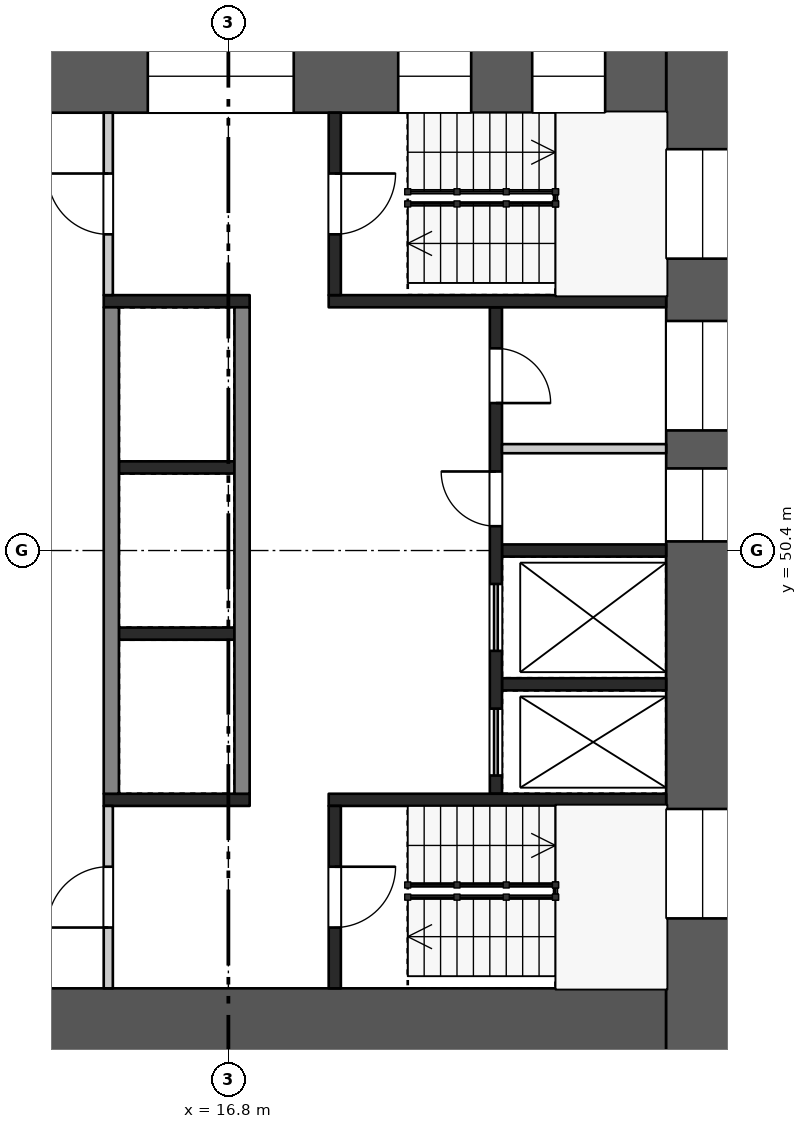
"""IFC4 building model, lengths in metres.
Left out: names, types, materials, properties, quantities, classifications, styles, units other than length and angle.
Written with IfcOpenShell. Run it as: python <this file> out.ifc"""

import sys

from ifc_helpers import new_model, si_unit, direction, frame, frame_2d, origin, place, context, subcontext, project, spatial, rectangle, extrude, element, fill, save


model = new_model("IFC4")
c1 = context("Model", 3, precision=1e-05, world=origin(), true_north=direction((0.0, 1.0)))
c2 = subcontext(c1, "Body", "Model", "MODEL_VIEW")
j1 = project(units=[si_unit("LENGTHUNIT", "METRE"), si_unit("PLANEANGLEUNIT", "RADIAN")], contexts=[c1])
p1 = place(None, origin())
s1 = spatial("IfcSite", under=j1, at=p1, CompositionType="ELEMENT")
p2 = place(p1, origin())
s2 = spatial("IfcBuilding", under=s1, at=p2, CompositionType="ELEMENT")
p3 = place(p2, frame((0.0, 0.0, 46.2)))
s3 = spatial("IfcBuildingStorey", under=s2, at=p3, CompositionType="ELEMENT", Elevation=46.2)
p4 = place(p3, frame((24.6, 58.8, 0.0), z_axis=(0.0, 0.0, 1.0), x_axis=(0.0, -1.0, 0.0)))
e1 = element("IfcWall", 1, at=p4, inside=s3, PredefinedType="SHEAR", context=c2, shape_type="SweptSolid", body=[
    extrude(rectangle(XDim=16.8, YDim=1.2, at=frame_2d((8.4, 0.0))), origin(), (0.0, 0.0, 1.0), 3.22),
])
p5 = place(p4, frame((1.8, 0.0, 0.5)))
e2 = element("IfcOpeningElement", 2, at=p5, cuts=e1, PredefinedType="OPENING", context=c2, shape_type="SweptSolid", body=[
    extrude(rectangle(XDim=1.8, YDim=2.4, at=frame_2d((0.9, 1.2))), frame((0.0, 0.61, 0.0), z_axis=(0.0, -1.0, 0.0), x_axis=(1.0, 0.0, 0.0)), (0.0, 0.0, 1.0), 1.22),
])
p6 = place(p4, frame((4.625, 0.0, 1.6)))
e3 = element("IfcOpeningElement", 3, at=p6, cuts=e1, PredefinedType="OPENING", context=c2, shape_type="SweptSolid", body=[
    extrude(rectangle(XDim=1.8, YDim=1.2, at=frame_2d((0.9, 0.6))), frame((0.0, 0.61, 0.0), z_axis=(0.0, -1.0, 0.0), x_axis=(1.0, 0.0, 0.0)), (0.0, 0.0, 1.0), 1.22),
])
p7 = place(p4, frame((7.05, 0.0, 1.6)))
e4 = element("IfcOpeningElement", 4, at=p7, cuts=e1, PredefinedType="OPENING", context=c2, shape_type="SweptSolid", body=[
    extrude(rectangle(XDim=1.2, YDim=1.2, at=frame_2d((0.6, 0.6))), frame((0.0, 0.61, 0.0), z_axis=(0.0, -1.0, 0.0), x_axis=(1.0, 0.0, 0.0)), (0.0, 0.0, 1.0), 1.22),
])
p8 = place(p4, frame((12.65, 0.0, 0.5)))
e5 = element("IfcOpeningElement", 5, at=p8, cuts=e1, PredefinedType="OPENING", context=c2, shape_type="SweptSolid", body=[
    extrude(rectangle(XDim=1.8, YDim=2.4, at=frame_2d((0.9, 1.2))), frame((0.0, 0.61, 0.0), z_axis=(0.0, -1.0, 0.0), x_axis=(1.0, 0.0, 0.0)), (0.0, 0.0, 1.0), 1.22),
])
p9 = place(p3, frame((9.6, 58.2, 0.0), z_axis=(0.0, 0.0, 1.0), x_axis=(1.0, 0.0, 0.0)))
e6 = element("IfcWall", 6, at=p9, inside=s3, PredefinedType="SHEAR", context=c2, shape_type="SweptSolid", body=[
    extrude(rectangle(XDim=14.4, YDim=1.2, at=frame_2d((7.2, 0.0))), origin(), (0.0, 0.0, 1.0), 3.22),
])
p10 = place(p9, frame((1.105, 0.0, 0.6)))
e7 = element("IfcOpeningElement", 7, at=p10, cuts=e6, PredefinedType="OPENING", context=c2, shape_type="SweptSolid", body=[
    extrude(rectangle(XDim=3.0, YDim=2.1, at=frame_2d((1.5, 1.05))), frame((0.0, 0.61, 0.0), z_axis=(0.0, -1.0, 0.0), x_axis=(1.0, 0.0, 0.0)), (0.0, 0.0, 1.0), 1.22),
])
p11 = place(p9, frame((5.875, 0.0, 0.6)))
e8 = element("IfcOpeningElement", 8, at=p11, cuts=e6, PredefinedType="OPENING", context=c2, shape_type="SweptSolid", body=[
    extrude(rectangle(XDim=2.4, YDim=2.1, at=frame_2d((1.2, 1.05))), frame((0.0, 0.61, 0.0), z_axis=(0.0, -1.0, 0.0), x_axis=(1.0, 0.0, 0.0)), (0.0, 0.0, 1.0), 1.22),
])
p12 = place(p9, frame((9.993, 0.0, 0.5)))
e9 = element("IfcOpeningElement", 9, at=p12, cuts=e6, PredefinedType="OPENING", context=c2, shape_type="SweptSolid", body=[
    extrude(rectangle(XDim=1.2, YDim=2.4, at=frame_2d((0.6, 1.2))), frame((0.0, 0.61, 0.0), z_axis=(0.0, -1.0, 0.0), x_axis=(1.0, 0.0, 0.0)), (0.0, 0.0, 1.0), 1.22),
])
p13 = place(p9, frame((12.197, 0.0, 0.5)))
e10 = element("IfcOpeningElement", 10, at=p13, cuts=e6, PredefinedType="OPENING", context=c2, shape_type="SweptSolid", body=[
    extrude(rectangle(XDim=1.2, YDim=2.4, at=frame_2d((0.6, 1.2))), frame((0.0, 0.61, 0.0), z_axis=(0.0, -1.0, 0.0), x_axis=(1.0, 0.0, 0.0)), (0.0, 0.0, 1.0), 1.22),
])
p14 = place(p3, frame((9.6, 42.6, 0.0), z_axis=(0.0, 0.0, 1.0), x_axis=(1.0, 0.0, 0.0)))
e11 = element("IfcWall", 11, at=p14, inside=s3, PredefinedType="SHEAR", context=c2, shape_type="SweptSolid", body=[
    extrude(rectangle(XDim=14.4, YDim=1.2, at=frame_2d((7.2, 0.0))), origin(), (0.0, 0.0, 1.0), 3.22),
])
p15 = place(p14, frame((2.1, 0.0, 0.0)))
e12 = element("IfcOpeningElement", 12, at=p15, cuts=e11, PredefinedType="OPENING", context=c2, shape_type="SweptSolid", body=[
    extrude(rectangle(XDim=1.8, YDim=2.1, at=frame_2d((0.9, 1.05))), frame((0.0, 0.61, 0.0), z_axis=(0.0, -1.0, 0.0), x_axis=(1.0, 0.0, 0.0)), (0.0, 0.0, 1.0), 1.22),
])
for number, where, z_axis, x_axis in (
    (13, (15.0, 51.767, 0.0), (0.0, 0.0, 1.0), (1.0, 0.0, 0.0)),
    (14, (15.0, 49.033, 0.0), (0.0, 0.0, 1.0), (1.0, 0.0, 0.0)),
):
    element("IfcWall", number, at=place(p3, frame(where, z_axis=z_axis, x_axis=x_axis)), inside=s3, PredefinedType="SHEAR", context=c2, shape_type="SweptSolid", body=[
        extrude(rectangle(XDim=1.9, YDim=0.2, at=frame_2d((0.95, 0.0))), origin(), (0.0, 0.0, 1.0), 3.22),
    ])
for number, where, z_axis, x_axis in (
    (15, (14.875, 54.4, 0.0), (0.0, 0.0, 1.0), (0.0, -1.0, 0.0)),
    (16, (17.025, 54.4, 0.0), (0.0, 0.0, 1.0), (0.0, -1.0, 0.0)),
):
    element("IfcWall", number, at=place(p3, frame(where, z_axis=z_axis, x_axis=x_axis)), inside=s3, PredefinedType="SHEAR", context=c2, shape_type="SweptSolid", body=[
        extrude(rectangle(XDim=8.0, YDim=0.25, at=frame_2d((4.0, 0.0))), origin(), (0.0, 0.0, 1.0), 3.22),
    ])
for number, where, z_axis, x_axis in (
    (17, (21.3, 50.4, 0.0), (0.0, 0.0, 1.0), (1.0, 0.0, 0.0)),
    (18, (21.3, 48.2, 0.0), (0.0, 0.0, 1.0), (1.0, 0.0, 0.0)),
):
    element("IfcWall", number, at=place(p3, frame(where, z_axis=z_axis, x_axis=x_axis)), inside=s3, PredefinedType="SHEAR", context=c2, shape_type="SweptSolid", body=[
        extrude(rectangle(XDim=2.7, YDim=0.2, at=frame_2d((1.35, 0.0))), origin(), (0.0, 0.0, 1.0), 3.22),
    ])
p16 = place(p3, frame((21.3, 52.075, 0.0), z_axis=(0.0, 0.0, 1.0), x_axis=(1.0, 0.0, 0.0)))
e19 = element("IfcWall", 19, at=p16, inside=s3, PredefinedType="PARTITIONING", context=c2, shape_type="SweptSolid", body=[
    extrude(rectangle(XDim=2.7, YDim=0.15, at=frame_2d((1.35, 0.0))), origin(), (0.0, 0.0, 1.0), 3.22),
])
p17 = place(p3, frame((21.2, 54.4, 0.0), z_axis=(0.0, 0.0, 1.0), x_axis=(0.0, -1.0, 0.0)))
e20 = element("IfcWall", 20, at=p17, inside=s3, PredefinedType="SHEAR", context=c2, shape_type="SweptSolid", body=[
    extrude(rectangle(XDim=8.0, YDim=0.2, at=frame_2d((4.0, 0.0))), origin(), (0.0, 0.0, 1.0), 3.22),
])
p18 = place(p17, frame((0.675, 0.0, 0.0)))
e21 = element("IfcOpeningElement", 21, at=p18, cuts=e20, PredefinedType="OPENING", context=c2, shape_type="SweptSolid", body=[
    extrude(rectangle(XDim=0.9, YDim=2.1, at=frame_2d((0.45, 1.05))), frame((0.0, 0.11, 0.0), z_axis=(0.0, -1.0, 0.0), x_axis=(1.0, 0.0, 0.0)), (0.0, 0.0, 1.0), 0.22),
])
p19 = place(p17, frame((2.7, 0.0, 0.0)))
e22 = element("IfcOpeningElement", 22, at=p19, cuts=e20, PredefinedType="OPENING", context=c2, shape_type="SweptSolid", body=[
    extrude(rectangle(XDim=0.9, YDim=2.1, at=frame_2d((0.45, 1.05))), frame((0.0, 0.11, 0.0), z_axis=(0.0, -1.0, 0.0), x_axis=(1.0, 0.0, 0.0)), (0.0, 0.0, 1.0), 0.22),
])
p20 = place(p17, frame((4.55, 0.0, 0.0)))
e23 = element("IfcOpeningElement", 23, at=p20, cuts=e20, PredefinedType="OPENING", context=c2, shape_type="SweptSolid", body=[
    extrude(rectangle(XDim=1.1, YDim=2.1, at=frame_2d((0.55, 1.05))), frame((0.0, 0.11, 0.0), z_axis=(0.0, -1.0, 0.0), x_axis=(1.0, 0.0, 0.0)), (0.0, 0.0, 1.0), 0.22),
])
p21 = place(p17, frame((6.6, 0.0, 0.0)))
e24 = element("IfcOpeningElement", 24, at=p21, cuts=e20, PredefinedType="OPENING", context=c2, shape_type="SweptSolid", body=[
    extrude(rectangle(XDim=1.1, YDim=2.1, at=frame_2d((0.55, 1.05))), frame((0.0, 0.11, 0.0), z_axis=(0.0, -1.0, 0.0), x_axis=(1.0, 0.0, 0.0)), (0.0, 0.0, 1.0), 0.22),
])
p22 = place(p3, frame((14.75, 54.5, 0.0), z_axis=(0.0, 0.0, 1.0), x_axis=(1.0, 0.0, 0.0)))
e25 = element("IfcWall", 25, at=p22, inside=s3, PredefinedType="SHEAR", context=c2, shape_type="SweptSolid", body=[
    extrude(rectangle(XDim=2.4, YDim=0.2, at=frame_2d((1.2, 0.0))), origin(), (0.0, 0.0, 1.0), 3.22),
])
p23 = place(p3, frame((18.45, 54.5, 0.0), z_axis=(0.0, 0.0, 1.0), x_axis=(1.0, 0.0, 0.0)))
e26 = element("IfcWall", 26, at=p23, inside=s3, PredefinedType="SHEAR", context=c2, shape_type="SweptSolid", body=[
    extrude(rectangle(XDim=5.55, YDim=0.2, at=frame_2d((2.775, 0.0))), origin(), (0.0, 0.0, 1.0), 3.22),
])
p24 = place(p3, frame((14.825, 57.6, 0.0), z_axis=(0.0, 0.0, 1.0), x_axis=(0.0, -1.0, 0.0)))
e27 = element("IfcWall", 27, at=p24, inside=s3, PredefinedType="PARTITIONING", context=c2, shape_type="SweptSolid", body=[
    extrude(rectangle(XDim=3.0, YDim=0.15, at=frame_2d((1.5, 0.0))), origin(), (0.0, 0.0, 1.0), 3.22),
])
p25 = place(p24, frame((1.0, 0.0, 0.0)))
e28 = element("IfcOpeningElement", 28, at=p25, cuts=e27, PredefinedType="OPENING", context=c2, shape_type="SweptSolid", body=[
    extrude(rectangle(XDim=1.0, YDim=2.1, at=frame_2d((0.5, 1.05))), frame((0.0, 0.085, 0.0), z_axis=(0.0, -1.0, 0.0), x_axis=(1.0, 0.0, 0.0)), (0.0, 0.0, 1.0), 0.17),
])
p26 = place(p3, frame((18.55, 57.6, 0.0), z_axis=(0.0, 0.0, 1.0), x_axis=(0.0, -1.0, 0.0)))
e29 = element("IfcWall", 29, at=p26, inside=s3, PredefinedType="SHEAR", context=c2, shape_type="SweptSolid", body=[
    extrude(rectangle(XDim=3.0, YDim=0.2, at=frame_2d((1.5, 0.0))), origin(), (0.0, 0.0, 1.0), 3.22),
])
p27 = place(p26, frame((1.0, 0.0, 0.0)))
e30 = element("IfcOpeningElement", 30, at=p27, cuts=e29, PredefinedType="OPENING", context=c2, shape_type="SweptSolid", body=[
    extrude(rectangle(XDim=1.0, YDim=2.1, at=frame_2d((0.5, 1.05))), frame((0.0, 0.11, 0.0), z_axis=(0.0, -1.0, 0.0), x_axis=(1.0, 0.0, 0.0)), (0.0, 0.0, 1.0), 0.22),
])
p28 = place(p3, frame((14.75, 46.3, 0.0), z_axis=(0.0, 0.0, 1.0), x_axis=(1.0, 0.0, 0.0)))
e31 = element("IfcWall", 31, at=p28, inside=s3, PredefinedType="SHEAR", context=c2, shape_type="SweptSolid", body=[
    extrude(rectangle(XDim=2.4, YDim=0.2, at=frame_2d((1.2, 0.0))), origin(), (0.0, 0.0, 1.0), 3.22),
])
p29 = place(p3, frame((18.45, 46.3, 0.0), z_axis=(0.0, 0.0, 1.0), x_axis=(1.0, 0.0, 0.0)))
e32 = element("IfcWall", 32, at=p29, inside=s3, PredefinedType="SHEAR", context=c2, shape_type="SweptSolid", body=[
    extrude(rectangle(XDim=5.55, YDim=0.2, at=frame_2d((2.775, 0.0))), origin(), (0.0, 0.0, 1.0), 3.22),
])
p30 = place(p3, frame((14.825, 46.2, 0.0), z_axis=(0.0, 0.0, 1.0), x_axis=(0.0, -1.0, 0.0)))
e33 = element("IfcWall", 33, at=p30, inside=s3, PredefinedType="PARTITIONING", context=c2, shape_type="SweptSolid", body=[
    extrude(rectangle(XDim=3.0, YDim=0.15, at=frame_2d((1.5, 0.0))), origin(), (0.0, 0.0, 1.0), 3.22),
])
p31 = place(p30, frame((1.0, 0.0, 0.0)))
e34 = element("IfcOpeningElement", 34, at=p31, cuts=e33, PredefinedType="OPENING", context=c2, shape_type="SweptSolid", body=[
    extrude(rectangle(XDim=1.0, YDim=2.1, at=frame_2d((0.5, 1.05))), frame((0.0, 0.085, 0.0), z_axis=(0.0, -1.0, 0.0), x_axis=(1.0, 0.0, 0.0)), (0.0, 0.0, 1.0), 0.17),
])
p32 = place(p3, frame((18.55, 46.2, 0.0), z_axis=(0.0, 0.0, 1.0), x_axis=(0.0, -1.0, 0.0)))
e35 = element("IfcWall", 35, at=p32, inside=s3, PredefinedType="SHEAR", context=c2, shape_type="SweptSolid", body=[
    extrude(rectangle(XDim=3.0, YDim=0.2, at=frame_2d((1.5, 0.0))), origin(), (0.0, 0.0, 1.0), 3.22),
])
p33 = place(p32, frame((1.0, 0.0, 0.0)))
e36 = element("IfcOpeningElement", 36, at=p33, cuts=e35, PredefinedType="OPENING", context=c2, shape_type="SweptSolid", body=[
    extrude(rectangle(XDim=1.0, YDim=2.1, at=frame_2d((0.5, 1.05))), frame((0.0, 0.11, 0.0), z_axis=(0.0, -1.0, 0.0), x_axis=(1.0, 0.0, 0.0)), (0.0, 0.0, 1.0), 0.22),
])
p34 = place(p18, origin())
e37 = element("IfcDoor", 37, at=p34, inside=s3, OperationType="SINGLE_SWING_RIGHT", PredefinedType="DOOR", context=c2, shape_type="SweptSolid", body=[
    extrude(rectangle(XDim=0.9, YDim=2.1, at=frame_2d((0.45, 1.05))), frame((0.0, 0.025, 0.0), z_axis=(0.0, -1.0, 0.0), x_axis=(1.0, 0.0, 0.0)), (0.0, 0.0, 1.0), 0.05),
])
fill(e21, e37)
p35 = place(p19, frame((0.9, 0.0, 0.0), z_axis=(0.0, 0.0, 1.0), x_axis=(-1.0, 0.0, 0.0)))
e38 = element("IfcDoor", 38, at=p35, inside=s3, OperationType="SINGLE_SWING_RIGHT", PredefinedType="DOOR", context=c2, shape_type="SweptSolid", body=[
    extrude(rectangle(XDim=0.9, YDim=2.1, at=frame_2d((0.45, 1.05))), frame((0.0, 0.025, 0.0), z_axis=(0.0, -1.0, 0.0), x_axis=(1.0, 0.0, 0.0)), (0.0, 0.0, 1.0), 0.05),
])
fill(e22, e38)
p36 = place(p20, origin())
e39 = element("IfcDoor", 39, at=p36, inside=s3, OperationType="DOUBLE_DOOR_SLIDING", PredefinedType="DOOR", context=c2, shape_type="SweptSolid", body=[
    extrude(rectangle(XDim=1.1, YDim=2.1, at=frame_2d((0.55, 1.05))), frame((0.0, 0.025, 0.0), z_axis=(0.0, -1.0, 0.0), x_axis=(1.0, 0.0, 0.0)), (0.0, 0.0, 1.0), 0.05),
])
fill(e23, e39)
p37 = place(p21, origin())
e40 = element("IfcDoor", 40, at=p37, inside=s3, OperationType="DOUBLE_DOOR_SLIDING", PredefinedType="DOOR", context=c2, shape_type="SweptSolid", body=[
    extrude(rectangle(XDim=1.1, YDim=2.1, at=frame_2d((0.55, 1.05))), frame((0.0, 0.025, 0.0), z_axis=(0.0, -1.0, 0.0), x_axis=(1.0, 0.0, 0.0)), (0.0, 0.0, 1.0), 0.05),
])
fill(e24, e40)
p38 = place(p25, frame((1.0, 0.0, 0.0), z_axis=(0.0, 0.0, 1.0), x_axis=(-1.0, 0.0, 0.0)))
e41 = element("IfcDoor", 41, at=p38, inside=s3, OperationType="SINGLE_SWING_RIGHT", PredefinedType="DOOR", context=c2, shape_type="SweptSolid", body=[
    extrude(rectangle(XDim=1.0, YDim=2.1, at=frame_2d((0.5, 1.05))), frame((0.0, 0.025, 0.0), z_axis=(0.0, -1.0, 0.0), x_axis=(1.0, 0.0, 0.0)), (0.0, 0.0, 1.0), 0.05),
])
fill(e28, e41)
p39 = place(p27, origin())
e42 = element("IfcDoor", 42, at=p39, inside=s3, OperationType="SINGLE_SWING_LEFT", PredefinedType="DOOR", context=c2, shape_type="SweptSolid", body=[
    extrude(rectangle(XDim=1.0, YDim=2.1, at=frame_2d((0.5, 1.05))), frame((0.0, 0.025, 0.0), z_axis=(0.0, -1.0, 0.0), x_axis=(1.0, 0.0, 0.0)), (0.0, 0.0, 1.0), 0.05),
])
fill(e30, e42)
p40 = place(p31, frame((1.0, 0.0, 0.0), z_axis=(0.0, 0.0, 1.0), x_axis=(-1.0, 0.0, 0.0)))
e43 = element("IfcDoor", 43, at=p40, inside=s3, OperationType="SINGLE_SWING_LEFT", PredefinedType="DOOR", context=c2, shape_type="SweptSolid", body=[
    extrude(rectangle(XDim=1.0, YDim=2.1, at=frame_2d((0.5, 1.05))), frame((0.0, 0.025, 0.0), z_axis=(0.0, -1.0, 0.0), x_axis=(1.0, 0.0, 0.0)), (0.0, 0.0, 1.0), 0.05),
])
fill(e34, e43)
p41 = place(p33, origin())
e44 = element("IfcDoor", 44, at=p41, inside=s3, OperationType="SINGLE_SWING_LEFT", PredefinedType="DOOR", context=c2, shape_type="SweptSolid", body=[
    extrude(rectangle(XDim=1.0, YDim=2.1, at=frame_2d((0.5, 1.05))), frame((0.0, 0.025, 0.0), z_axis=(0.0, -1.0, 0.0), x_axis=(1.0, 0.0, 0.0)), (0.0, 0.0, 1.0), 0.05),
])
fill(e36, e44)
p42 = place(p5, origin())
e45 = element("IfcWindow", 45, at=p42, inside=s3, PartitioningType="SINGLE_PANEL", PredefinedType="WINDOW", context=c2, shape_type="SweptSolid", body=[
    extrude(rectangle(XDim=1.8, YDim=2.4, at=frame_2d((0.9, 1.2))), frame((0.0, 0.03, 0.0), z_axis=(0.0, -1.0, 0.0), x_axis=(1.0, 0.0, 0.0)), (0.0, 0.0, 1.0), 0.06),
])
fill(e2, e45)
p43 = place(p6, origin())
e46 = element("IfcWindow", 46, at=p43, inside=s3, PartitioningType="SINGLE_PANEL", PredefinedType="WINDOW", context=c2, shape_type="SweptSolid", body=[
    extrude(rectangle(XDim=1.8, YDim=1.2, at=frame_2d((0.9, 0.6))), frame((0.0, 0.03, 0.0), z_axis=(0.0, -1.0, 0.0), x_axis=(1.0, 0.0, 0.0)), (0.0, 0.0, 1.0), 0.06),
])
fill(e3, e46)
p44 = place(p7, origin())
e47 = element("IfcWindow", 47, at=p44, inside=s3, PartitioningType="SINGLE_PANEL", PredefinedType="WINDOW", context=c2, shape_type="SweptSolid", body=[
    extrude(rectangle(XDim=1.2, YDim=1.2, at=frame_2d((0.6, 0.6))), frame((0.0, 0.03, 0.0), z_axis=(0.0, -1.0, 0.0), x_axis=(1.0, 0.0, 0.0)), (0.0, 0.0, 1.0), 0.06),
])
fill(e4, e47)
p45 = place(p8, origin())
e48 = element("IfcWindow", 48, at=p45, inside=s3, PartitioningType="SINGLE_PANEL", PredefinedType="WINDOW", context=c2, shape_type="SweptSolid", body=[
    extrude(rectangle(XDim=1.8, YDim=2.4, at=frame_2d((0.9, 1.2))), frame((0.0, 0.03, 0.0), z_axis=(0.0, -1.0, 0.0), x_axis=(1.0, 0.0, 0.0)), (0.0, 0.0, 1.0), 0.06),
])
fill(e5, e48)
p46 = place(p11, origin())
e49 = element("IfcWindow", 49, at=p46, inside=s3, PartitioningType="SINGLE_PANEL", PredefinedType="WINDOW", context=c2, shape_type="SweptSolid", body=[
    extrude(rectangle(XDim=2.4, YDim=2.1, at=frame_2d((1.2, 1.05))), frame((0.0, 0.03, 0.0), z_axis=(0.0, -1.0, 0.0), x_axis=(1.0, 0.0, 0.0)), (0.0, 0.0, 1.0), 0.06),
])
fill(e8, e49)
p47 = place(p12, origin())
e50 = element("IfcWindow", 50, at=p47, inside=s3, PartitioningType="SINGLE_PANEL", PredefinedType="WINDOW", context=c2, shape_type="SweptSolid", body=[
    extrude(rectangle(XDim=1.2, YDim=2.4, at=frame_2d((0.6, 1.2))), frame((0.0, 0.03, 0.0), z_axis=(0.0, -1.0, 0.0), x_axis=(1.0, 0.0, 0.0)), (0.0, 0.0, 1.0), 0.06),
])
fill(e9, e50)
p48 = place(p13, origin())
e51 = element("IfcWindow", 51, at=p48, inside=s3, PartitioningType="SINGLE_PANEL", PredefinedType="WINDOW", context=c2, shape_type="SweptSolid", body=[
    extrude(rectangle(XDim=1.2, YDim=2.4, at=frame_2d((0.6, 1.2))), frame((0.0, 0.03, 0.0), z_axis=(0.0, -1.0, 0.0), x_axis=(1.0, 0.0, 0.0)), (0.0, 0.0, 1.0), 0.06),
])
fill(e10, e51)
save(model, sys.argv[1])
